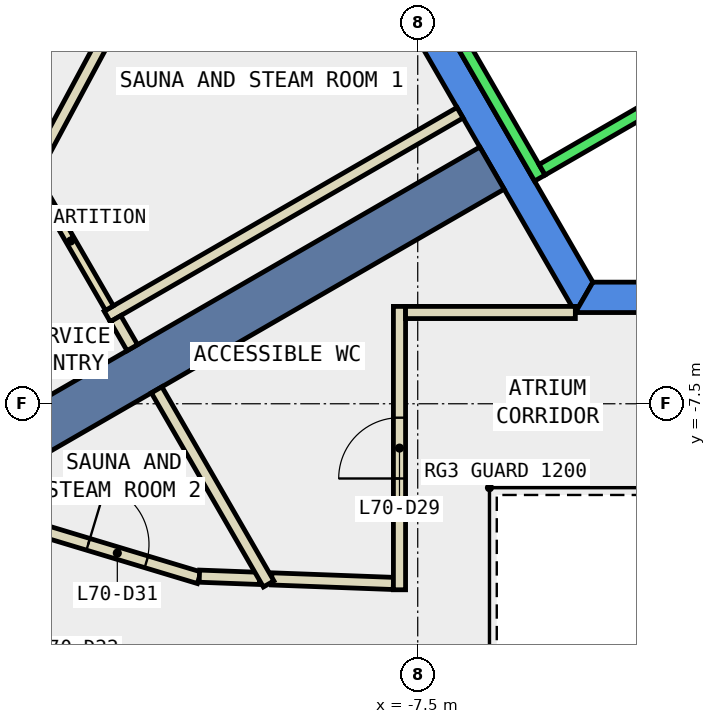
"""IFC4 building model, lengths in metres.
Left out: names, types, materials, properties, quantities, classifications, styles, units other than length and angle.
Written with IfcOpenShell. Run it as: python <this file> out.ifc"""

import sys

from ifc_helpers import new_model, si_unit, direction, frame, frame_2d, origin, place, context, subcontext, project, spatial, polyline, rectangle, outline, extrude, element, fill, save


model = new_model("IFC4")
c1 = context("Model", 3, precision=1e-05, world=origin(), true_north=direction((0.0, 1.0)))
c2 = subcontext(c1, "Body", "Model", "MODEL_VIEW")
j1 = project(units=[si_unit("LENGTHUNIT", "METRE"), si_unit("PLANEANGLEUNIT", "RADIAN")], contexts=[c1])
p1 = place(None, origin())
s1 = spatial("IfcSite", under=j1, at=p1, CompositionType="ELEMENT")
p2 = place(p1, origin())
s2 = spatial("IfcBuilding", under=s1, at=p2, CompositionType="ELEMENT")
p3 = place(p2, frame((0.0, 0.0, 300.8)))
s3 = spatial("IfcBuildingStorey", under=s2, at=p3, CompositionType="ELEMENT", Elevation=300.8)
p4 = place(p3, frame((0.0, 0.0, -0.34)))
e1 = element("IfcWall", 1, at=p4, inside=s3, PredefinedType="SHEAR", context=c2, shape_type="SweptSolid", body=[
    extrude(outline(polyline([(-9.815, 2.5), (-4.907, -6.0), (-4.619, -5.5), (-9.238, 2.5), (-9.815, 2.5)])), origin(), (0.0, 0.0, 1.0), 3.6),
])
p5 = place(p3, frame((0.0, 0.0, -0.34)))
e2 = element("IfcWall", 2, at=p5, inside=s3, PredefinedType="SHEAR", context=c2, shape_type="SweptSolid", body=[
    extrude(outline(polyline([(3.75, -6.0), (3.75, -5.5), (-4.619, -5.5), (-4.907, -6.0), (3.75, -6.0)])), origin(), (0.0, 0.0, 1.0), 3.6),
])
p6 = place(p3, frame((-6.279, -3.625, -0.34), z_axis=(0.0, 0.0, 1.0), x_axis=(-0.866017533419, -0.500013631625, 0.0)))
e3 = element("IfcWall", 3, at=p6, inside=s3, PredefinedType="SHEAR", context=c2, shape_type="SweptSolid", body=[
    extrude(rectangle(XDim=9.0, YDim=0.8, at=frame_2d((4.5, 0.0))), origin(), (0.0, 0.0, 1.0), 3.6),
])
p7 = place(p3, frame((-10.956, 1.659, 0.0), z_axis=(0.0, 0.0, 1.0), x_axis=(-0.473095976848, -0.881010894762, 0.0)))
e4 = element("IfcWall", 4, at=p7, inside=s3, PredefinedType="PARTITIONING", context=c2, shape_type="SweptSolid", body=[
    extrude(rectangle(XDim=6.18, YDim=0.2, at=frame_2d((3.09, 0.0))), origin(), (0.0, 0.0, 1.0), 3.26),
])
p8 = place(p7, frame((2.59, 0.0, 0.0)))
e5 = element("IfcOpeningElement", 5, at=p8, cuts=e4, PredefinedType="OPENING", context=c2, shape_type="SweptSolid", body=[
    extrude(rectangle(XDim=1.0, YDim=2.1, at=frame_2d((0.5, 1.05))), frame((0.0, 0.11, 0.0), z_axis=(0.0, -1.0, 0.0), x_axis=(1.0, 0.0, 0.0)), (0.0, 0.0, 1.0), 0.22),
])
p9 = place(p3, frame((-9.902, -10.38, 0.0), z_axis=(0.0, 0.0, 1.0), x_axis=(0.999295503749, -0.037529937222, 0.0)))
e6 = element("IfcWall", 6, at=p9, inside=s3, PredefinedType="PARTITIONING", context=c2, shape_type="SweptSolid", body=[
    extrude(rectangle(XDim=2.004, YDim=0.2, at=frame_2d((1.002, 0.0))), origin(), (0.0, 0.0, 1.0), 3.26),
])
p10 = place(p3, frame((-13.787, -9.55, 0.0), z_axis=(0.0, 0.0, 1.0), x_axis=(0.957493454064, -0.288454997225, 0.0)))
e7 = element("IfcWall", 7, at=p10, inside=s3, PredefinedType="PARTITIONING", context=c2, shape_type="SweptSolid", body=[
    extrude(rectangle(XDim=2.812, YDim=0.2, at=frame_2d((1.406, 0.0))), origin(), (0.0, 0.0, 1.0), 3.26),
])
p11 = place(p10, frame((0.906, 0.0, 0.0)))
e8 = element("IfcOpeningElement", 8, at=p11, cuts=e7, PredefinedType="OPENING", context=c2, shape_type="SweptSolid", body=[
    extrude(rectangle(XDim=1.0, YDim=2.1, at=frame_2d((0.5, 1.05))), frame((0.0, 0.11, 0.0), z_axis=(0.0, -1.0, 0.0), x_axis=(1.0, 0.0, 0.0)), (0.0, 0.0, 1.0), 0.22),
])
p12 = place(p3, frame((-11.091, -10.335, 0.0), z_axis=(0.0, 0.0, 1.0), x_axis=(0.999296807198, -0.037495214686, 0.0)))
e9 = element("IfcWall", 9, at=p12, inside=s3, PredefinedType="PARTITIONING", context=c2, shape_type="SweptSolid", body=[
    extrude(rectangle(XDim=0.99, YDim=0.2, at=frame_2d((0.495, 0.0))), origin(), (0.0, 0.0, 1.0), 3.26),
])
p13 = place(p3, frame((-12.968, -11.781, 0.0), z_axis=(0.0, 0.0, 1.0), x_axis=(-0.957517271828, 0.288375925054, 0.0)))
e10 = element("IfcWall", 10, at=p13, inside=s3, PredefinedType="PARTITIONING", context=c2, shape_type="SweptSolid", body=[
    extrude(rectangle(XDim=1.699, YDim=0.2, at=frame_2d((0.85, 0.0))), origin(), (0.0, 0.0, 1.0), 3.26),
])
p14 = place(p3, frame((-7.8, -10.559, 0.0), z_axis=(0.0, 0.0, 1.0), x_axis=(0.0, 1.0, 0.0)))
e11 = element("IfcWall", 11, at=p14, inside=s3, PredefinedType="PARTITIONING", context=c2, shape_type="SweptSolid", body=[
    extrude(rectangle(XDim=4.66, YDim=0.2, at=frame_2d((2.33, 0.0))), origin(), (0.0, 0.0, 1.0), 3.26),
])
p15 = place(p14, frame((1.83, 0.0, 0.0)))
e12 = element("IfcOpeningElement", 12, at=p15, cuts=e11, PredefinedType="OPENING", context=c2, shape_type="SweptSolid", body=[
    extrude(rectangle(XDim=1.0, YDim=2.1, at=frame_2d((0.5, 1.05))), frame((0.0, 0.11, 0.0), z_axis=(0.0, -1.0, 0.0), x_axis=(1.0, 0.0, 0.0)), (0.0, 0.0, 1.0), 0.22),
])
p16 = place(p3, frame((-7.7, -5.999, 0.0), z_axis=(0.0, 0.0, 1.0), x_axis=(1.0, 0.0, 0.0)))
e13 = element("IfcWall", 13, at=p16, inside=s3, PredefinedType="PARTITIONING", context=c2, shape_type="SweptSolid", body=[
    extrude(rectangle(XDim=2.792, YDim=0.2, at=frame_2d((1.396, 0.0))), origin(), (0.0, 0.0, 1.0), 3.26),
])
p17 = place(p3, frame((-6.804, -2.714, 0.0), z_axis=(0.0, 0.0, 1.0), x_axis=(-0.866057565063, -0.499944290893, 0.0)))
e14 = element("IfcWall", 14, at=p17, inside=s3, PredefinedType="PARTITIONING", context=c2, shape_type="SweptSolid", body=[
    extrude(rectangle(XDim=6.7, YDim=0.2, at=frame_2d((3.35, 0.0))), origin(), (0.0, 0.0, 1.0), 3.26),
])
p18 = place(p3, frame((-12.57, -5.927, 0.0), z_axis=(0.0, 0.0, 1.0), x_axis=(-0.500197803108, 0.865911171983, 0.0)))
e15 = element("IfcWall", 15, at=p18, inside=s3, PredefinedType="PARTITIONING", context=c2, shape_type="SweptSolid", body=[
    extrude(rectangle(XDim=2.549, YDim=0.15, at=frame_2d((1.274, 0.0))), origin(), (0.0, 0.0, 1.0), 3.26),
])
p19 = place(p3, frame((-12.194, -6.578, 0.0), z_axis=(0.0, 0.0, 1.0), x_axis=(-0.500809139387, 0.865557742676, 0.0)))
e16 = element("IfcWall", 16, at=p19, inside=s3, PredefinedType="PARTITIONING", context=c2, shape_type="SweptSolid", body=[
    extrude(rectangle(XDim=0.551, YDim=0.2, at=frame_2d((0.275, 0.0))), origin(), (0.0, 0.0, 1.0), 3.26),
])
p20 = place(p3, frame((-9.952, -10.463, 0.0), z_axis=(0.0, 0.0, 1.0), x_axis=(-0.499837150608, 0.866119404512, 0.0)))
e17 = element("IfcWall", 17, at=p20, inside=s3, PredefinedType="PARTITIONING", context=c2, shape_type="SweptSolid", body=[
    extrude(rectangle(XDim=3.685, YDim=0.2, at=frame_2d((1.843, 0.0))), origin(), (0.0, 0.0, 1.0), 3.26),
])
p21 = place(p3, frame((-5.94, 2.188, 0.0), z_axis=(0.0, 0.0, 1.0), x_axis=(0.500034260056, -0.866005622828, 0.0)))
e18 = element("IfcWall", 18, at=p21, inside=s3, PredefinedType="STANDARD", context=c2, shape_type="SweptSolid", body=[
    extrude(rectangle(XDim=5.399, YDim=0.2, at=frame_2d((2.7, 0.0))), origin(), (0.0, 0.0, 1.0), 3.26),
])
p22 = place(p21, frame((3.075, 0.0, 0.0)))
e19 = element("IfcOpeningElement", 19, at=p22, cuts=e18, PredefinedType="OPENING", context=c2, shape_type="SweptSolid", body=[
    extrude(rectangle(XDim=1.1, YDim=2.1, at=frame_2d((0.55, 1.05))), frame((0.0, 0.11, 0.0), z_axis=(0.0, -1.0, 0.0), x_axis=(1.0, 0.0, 0.0)), (0.0, 0.0, 1.0), 0.22),
])
p23 = place(p21, frame((1.225, 0.0, 0.0)))
e20 = element("IfcOpeningElement", 20, at=p23, cuts=e18, PredefinedType="OPENING", context=c2, shape_type="SweptSolid", body=[
    extrude(rectangle(XDim=1.1, YDim=2.1, at=frame_2d((0.55, 1.05))), frame((0.0, 0.11, 0.0), z_axis=(0.0, -1.0, 0.0), x_axis=(1.0, 0.0, 0.0)), (0.0, 0.0, 1.0), 0.22),
])
p24 = place(p3, frame((-8.192, 0.888, 0.0), z_axis=(0.0, 0.0, 1.0), x_axis=(0.500034260056, -0.866005622828, 0.0)))
e21 = element("IfcWall", 21, at=p24, inside=s3, PredefinedType="STANDARD", context=c2, shape_type="SweptSolid", body=[
    extrude(rectangle(XDim=5.399, YDim=0.2, at=frame_2d((2.7, 0.0))), origin(), (0.0, 0.0, 1.0), 3.26),
])
p25 = place(p3, frame((-3.377, -2.452, 0.0), z_axis=(0.0, 0.0, 1.0), x_axis=(-0.865955154139, -0.50012165622, 0.0)))
e22 = element("IfcWall", 22, at=p25, inside=s3, PredefinedType="STANDARD", context=c2, shape_type="SweptSolid", body=[
    extrude(rectangle(XDim=2.4, YDim=0.2, at=frame_2d((1.2, 0.0))), origin(), (0.0, 0.0, 1.0), 3.26),
])
p26 = place(p15, origin())
e23 = element("IfcDoor", 23, at=p26, inside=s3, OperationType="SINGLE_SWING_LEFT", PredefinedType="DOOR", context=c2, shape_type="SweptSolid", body=[
    extrude(rectangle(XDim=1.0, YDim=2.1, at=frame_2d((0.5, 1.05))), frame((0.0, 0.025, 0.0), z_axis=(0.0, -1.0, 0.0), x_axis=(1.0, 0.0, 0.0)), (0.0, 0.0, 1.0), 0.05),
])
fill(e12, e23)
p27 = place(p11, origin())
e24 = element("IfcDoor", 24, at=p27, inside=s3, OperationType="SINGLE_SWING_LEFT", PredefinedType="DOOR", context=c2, shape_type="SweptSolid", body=[
    extrude(rectangle(XDim=1.0, YDim=2.1, at=frame_2d((0.5, 1.05))), frame((0.0, 0.025, 0.0), z_axis=(0.0, -1.0, 0.0), x_axis=(1.0, 0.0, 0.0)), (0.0, 0.0, 1.0), 0.05),
])
fill(e8, e24)
save(model, sys.argv[1])
